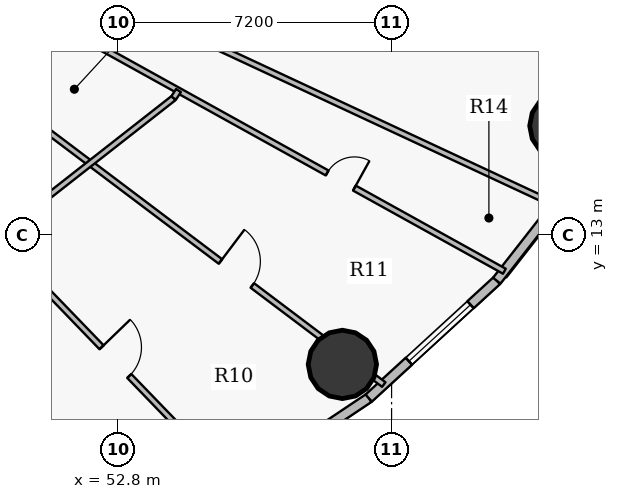
"""IFC4 building model, lengths in metres.
Left out: names, types, materials, properties, quantities, classifications, styles, units other than length and angle.
Written with IfcOpenShell. Run it as: python <this file> out.ifc"""

import sys

from ifc_helpers import new_model, si_unit, direction, frame, frame_2d, origin, origin_2d, place, context, subcontext, project, spatial, rectangle, hollow_circle, extrude, source, transform, mapped, element, fill, save


model = new_model("IFC4")
c1 = context("Model", 3, precision=1e-05, world=origin(), true_north=direction((0.0, 1.0)))
c2 = subcontext(c1, "Body", "Model", "MODEL_VIEW")
j1 = project(units=[si_unit("LENGTHUNIT", "METRE"), si_unit("PLANEANGLEUNIT", "RADIAN")], contexts=[c1])
p1 = place(None, origin())
s1 = spatial("IfcSite", under=j1, at=p1, CompositionType="ELEMENT")
p2 = place(p1, origin())
s2 = spatial("IfcBuilding", under=s1, at=p2, CompositionType="ELEMENT")
p3 = place(p2, frame((0.0, 0.0, 18.6)))
s3 = spatial("IfcBuildingStorey", under=s2, at=p3, CompositionType="ELEMENT", Elevation=18.6)
for number, where, z_axis, x_axis in (
    (1, (58.705, 9.599, 0.0), (0.0, 0.0, 1.0), (1.0, 0.0, 0.0)),
    (2, (64.534, 15.878, 0.0), (0.0, 0.0, 1.0), (1.0, 0.0, 0.0)),
):
    element("IfcColumn", number, at=place(p3, frame(where, z_axis=z_axis, x_axis=x_axis)), inside=s3, PredefinedType="COLUMN", context=c2, shape_type="SweptSolid", body=[
        extrude(hollow_circle(Radius=0.9, WallThickness=0.05, at=origin_2d()), origin(), (0.0, 0.0, 1.0), 4.2),
    ])
p4 = place(p3, frame((59.399, 8.714, 0.0), z_axis=(0.0, 0.0, 1.0), x_axis=(-0.831218664812, -0.555945618985, 0.0)))
e3 = element("IfcWall", 3, at=p4, inside=s3, PredefinedType="SOLIDWALL", context=c2, shape_type="SweptSolid", body=[
    extrude(rectangle(XDim=4.748, YDim=0.25, at=frame_2d((2.374, 0.0))), origin(), (0.0, 0.0, 1.0), 3.9),
])
p5 = place(p3, frame((62.768, 11.802, 0.0), z_axis=(0.0, 0.0, 1.0), x_axis=(-0.737076532105, -0.675809282136, 0.0)))
e4 = element("IfcWall", 4, at=p5, inside=s3, PredefinedType="SOLIDWALL", context=c2, shape_type="SweptSolid", body=[
    extrude(rectangle(XDim=4.571, YDim=0.25, at=frame_2d((2.285, 0.0))), origin(), (0.0, 0.0, 1.0), 3.9),
])
p6 = place(p5, frame((0.936, 0.0, 0.9)))
e5 = element("IfcOpeningElement", 5, at=p6, cuts=e4, PredefinedType="OPENING", context=c2, shape_type="SweptSolid", body=[
    extrude(rectangle(XDim=2.2, YDim=2.0, at=origin_2d()), frame((1.1, 0.135, 1.0), z_axis=(0.0, -1.0, 0.0), x_axis=(1.0, 0.0, 0.0)), (0.0, 0.0, 1.0), 0.27),
])
p7 = place(p3, frame((65.477, 15.264, 0.0), z_axis=(0.0, 0.0, 1.0), x_axis=(-0.61622589112, -0.787569457961, 0.0)))
e6 = element("IfcWall", 6, at=p7, inside=s3, PredefinedType="SOLIDWALL", context=c2, shape_type="SweptSolid", body=[
    extrude(rectangle(XDim=4.396, YDim=0.25, at=frame_2d((2.198, 0.0))), origin(), (0.0, 0.0, 1.0), 3.9),
])
p8 = place(p3, frame((47.781, 14.8, 0.0), z_axis=(0.0, 0.0, 1.0), x_axis=(0.694655165544, -0.719342895275, 0.0)))
e7 = element("IfcWall", 7, at=p8, inside=s3, PredefinedType="PARTITIONING", context=c2, shape_type="SweptSolid", body=[
    extrude(rectangle(XDim=11.709, YDim=0.15, at=frame_2d((5.854, 0.0))), origin(), (0.0, 0.0, 1.0), 3.285),
])
p9 = place(p8, frame((6.603, 0.0, 0.0)))
e8 = element("IfcOpeningElement", 8, at=p9, cuts=e7, PredefinedType="OPENING", context=c2, shape_type="SweptSolid", body=[
    extrude(rectangle(XDim=1.05, YDim=2.15, at=origin_2d()), frame((0.525, 0.085, 1.075), z_axis=(0.0, -1.0, 0.0), x_axis=(1.0, 0.0, 0.0)), (0.0, 0.0, 1.0), 0.17),
])
p10 = place(p3, frame((48.0, 17.957, 0.0), z_axis=(0.0, 0.0, 1.0), x_axis=(0.798637068648, -0.601812954814, 0.0)))
e9 = element("IfcWall", 9, at=p10, inside=s3, PredefinedType="PARTITIONING", context=c2, shape_type="SweptSolid", body=[
    extrude(rectangle(XDim=14.768, YDim=0.15, at=frame_2d((7.384, 0.0))), origin(), (0.0, 0.0, 1.0), 3.085),
])
p11 = place(p10, frame((9.388, 0.0, 0.0)))
e10 = element("IfcOpeningElement", 10, at=p11, cuts=e9, PredefinedType="OPENING", context=c2, shape_type="SweptSolid", body=[
    extrude(rectangle(XDim=1.05, YDim=2.15, at=origin_2d()), frame((0.525, 0.085, 1.075), z_axis=(0.0, -1.0, 0.0), x_axis=(1.0, 0.0, 0.0)), (0.0, 0.0, 1.0), 0.17),
])
p12 = place(p3, frame((48.0, 20.348, 0.0), z_axis=(0.0, 0.0, 1.0), x_axis=(0.874615123646, -0.484817888996, 0.0)))
e11 = element("IfcWall", 11, at=p12, inside=s3, PredefinedType="PARTITIONING", context=c2, shape_type="SweptSolid", body=[
    extrude(rectangle(XDim=17.115, YDim=0.15, at=frame_2d((8.557, 0.0))), origin(), (0.0, 0.0, 1.0), 3.285),
])
p13 = place(p12, frame((11.781, 0.0, 0.0)))
e12 = element("IfcOpeningElement", 12, at=p13, cuts=e11, PredefinedType="OPENING", context=c2, shape_type="SweptSolid", body=[
    extrude(rectangle(XDim=0.82, YDim=2.1, at=origin_2d()), frame((0.41, 0.085, 1.05), z_axis=(0.0, -1.0, 0.0), x_axis=(1.0, 0.0, 0.0)), (0.0, 0.0, 1.0), 0.17),
])
p14 = place(p3, frame((48.867, 21.0, 0.0), z_axis=(0.0, 0.0, 1.0), x_axis=(0.906305939421, -0.422622223942, 0.0)))
e13 = element("IfcWall", 13, at=p14, inside=s3, PredefinedType="PARTITIONING", context=c2, shape_type="SweptSolid", body=[
    extrude(rectangle(XDim=17.061, YDim=0.15, at=frame_2d((8.53, 0.0))), origin(), (0.0, 0.0, 1.0), 3.285),
])
p15 = place(p3, frame((49.579, 12.939, 0.0), z_axis=(0.0, 0.0, 1.0), x_axis=(0.787322308609, 0.616541630684, 0.0)))
e14 = element("IfcWall", 14, at=p15, inside=s3, PredefinedType="PARTITIONING", context=c2, shape_type="SweptSolid", body=[
    extrude(rectangle(XDim=5.951, YDim=0.15, at=frame_2d((2.976, 0.0))), origin(), (0.0, 0.0, 1.0), 3.085),
])
p16 = place(p3, frame((54.264, 16.608, 0.0), z_axis=(0.0, 0.0, 1.0), x_axis=(0.545316895374, 0.838229970604, 0.0)))
e15 = element("IfcWall", 15, at=p16, inside=s3, PredefinedType="PARTITIONING", context=c2, shape_type="SweptSolid", body=[
    extrude(rectangle(XDim=0.235, YDim=0.15, at=frame_2d((0.118, 0.0))), origin(), (0.0, 0.0, 1.0), 3.9),
])
m1 = source(origin(), c2, "Body", "SweptSolid", [
    extrude(rectangle(XDim=2.2, YDim=2.0, at=origin_2d()), frame((1.1, 0.03, 1.0), z_axis=(0.0, -1.0, 0.0), x_axis=(1.0, 0.0, 0.0)), (0.0, 0.0, 1.0), 0.06),
])
p17 = place(p6, origin())
e16 = element("IfcWindow", 16, at=p17, inside=s3, PartitioningType="TRIPLE_PANEL_VERTICAL", PredefinedType="WINDOW", context=c2, shape_type="MappedRepresentation", body=[
    mapped(m1, transform((0.0, 0.0, 0.0), x_axis=(1.0, 0.0, 0.0), y_axis=(0.0, 1.0, 0.0), z_axis=(0.0, 0.0, 1.0), scale=1.0)),
])
fill(e5, e16)
m2 = source(origin(), c2, "Body", "SweptSolid", [
    extrude(rectangle(XDim=1.05, YDim=2.15, at=origin_2d()), frame((0.525, 0.025, 1.075), z_axis=(0.0, -1.0, 0.0), x_axis=(1.0, 0.0, 0.0)), (0.0, 0.0, 1.0), 0.05),
])
p18 = place(p9, origin())
e17 = element("IfcDoor", 17, at=p18, inside=s3, OperationType="SINGLE_SWING_LEFT", PredefinedType="DOOR", context=c2, shape_type="MappedRepresentation", body=[
    mapped(m2, transform((0.0, 0.0, 0.0), x_axis=(1.0, 0.0, 0.0), y_axis=(0.0, 1.0, 0.0), z_axis=(0.0, 0.0, 1.0), scale=1.0)),
])
fill(e8, e17)
p19 = place(p11, origin())
e18 = element("IfcDoor", 18, at=p19, inside=s3, OperationType="SINGLE_SWING_LEFT", PredefinedType="DOOR", context=c2, shape_type="MappedRepresentation", body=[
    mapped(m2, transform((0.0, 0.0, 0.0), x_axis=(1.0, 0.0, 0.0), y_axis=(0.0, 1.0, 0.0), z_axis=(0.0, 0.0, 1.0), scale=1.0)),
])
fill(e10, e18)
m3 = source(origin(), c2, "Body", "SweptSolid", [
    extrude(rectangle(XDim=0.82, YDim=2.1, at=origin_2d()), frame((0.41, 0.025, 1.05), z_axis=(0.0, -1.0, 0.0), x_axis=(1.0, 0.0, 0.0)), (0.0, 0.0, 1.0), 0.05),
])
p20 = place(p13, origin())
e19 = element("IfcDoor", 19, at=p20, inside=s3, OperationType="SINGLE_SWING_RIGHT", PredefinedType="DOOR", context=c2, shape_type="MappedRepresentation", body=[
    mapped(m3, transform((0.0, 0.0, 0.0), x_axis=(1.0, 0.0, 0.0), y_axis=(0.0, 1.0, 0.0), z_axis=(0.0, 0.0, 1.0), scale=1.0)),
])
fill(e12, e19)
save(model, sys.argv[1])
